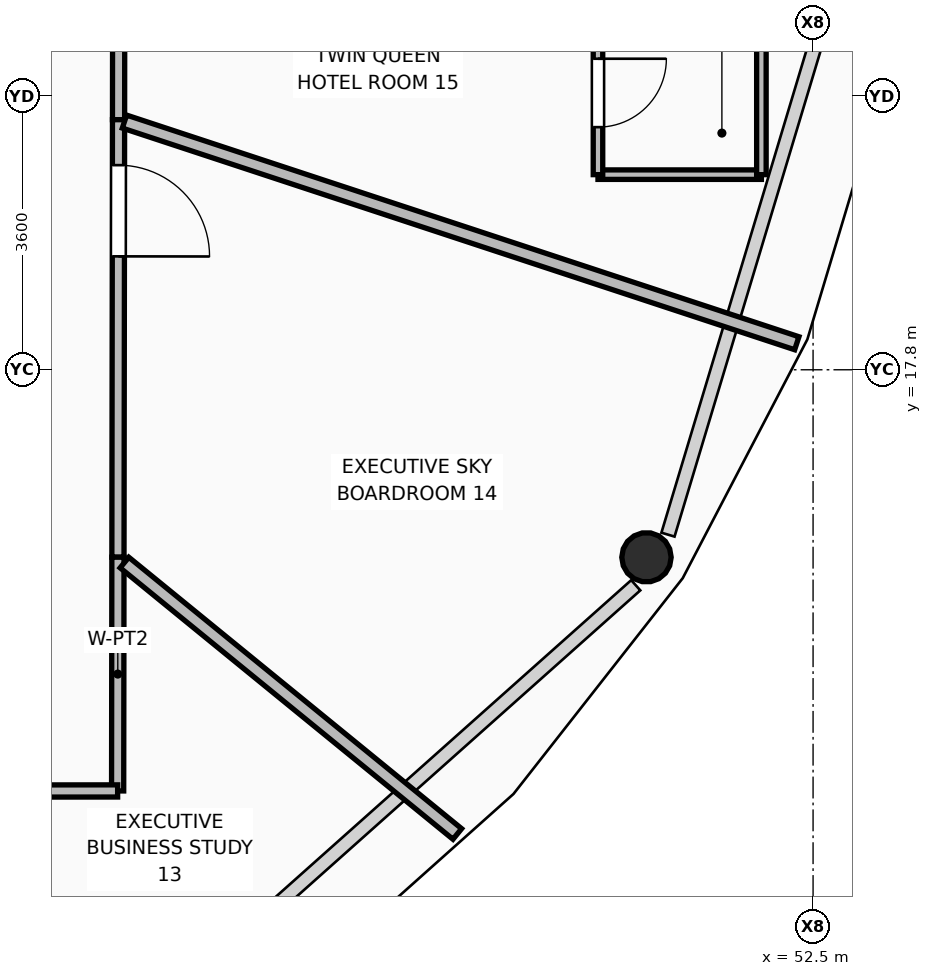
"""IFC4 building model, lengths in metres.
Left out: names, types, materials, properties, quantities, classifications, styles, units other than length and angle.
Written with IfcOpenShell. Run it as: python <this file> out.ifc"""

import sys

from ifc_helpers import new_model, si_unit, direction, frame, frame_2d, origin, origin_2d, place, context, subcontext, project, spatial, rectangle, hollow_circle, extrude, element, fill, save


model = new_model("IFC4")
c1 = context("Model", 3, precision=1e-05, world=origin(), true_north=direction((0.0, 1.0)))
c2 = subcontext(c1, "Body", "Model", "MODEL_VIEW")
j1 = project(units=[si_unit("LENGTHUNIT", "METRE"), si_unit("PLANEANGLEUNIT", "RADIAN")], contexts=[c1])
p1 = place(None, origin())
s1 = spatial("IfcSite", under=j1, at=p1, CompositionType="ELEMENT")
p2 = place(p1, origin())
s2 = spatial("IfcBuilding", under=s1, at=p2, CompositionType="ELEMENT")
p3 = place(p2, frame((0.0, 0.0, 249.9)))
s3 = spatial("IfcBuildingStorey", under=s2, at=p3, CompositionType="ELEMENT", Elevation=249.9)
p4 = place(p3, frame((50.308, 15.333, 0.0), z_axis=(-0.09041731247, 0.046908751519, 0.9947986121), x_axis=(-0.460516000373, -0.887651403086, 0.0)))
e1 = element("IfcColumn", 1, at=p4, inside=s3, PredefinedType="COLUMN", context=c2, shape_type="SweptSolid", body=[
    extrude(hollow_circle(Radius=0.325, WallThickness=0.03, at=origin_2d()), origin(), (0.0, 0.0, 1.0), 3.518),
])
p5 = place(p3, frame((43.365, 23.56, 0.0), z_axis=(0.0, 0.0, 1.0), x_axis=(-0.001186121534, -0.999999296558, 0.0)))
e2 = element("IfcWall", 2, at=p5, inside=s3, PredefinedType="PARTITIONING", context=c2, shape_type="SweptSolid", body=[
    extrude(rectangle(XDim=2.47, YDim=0.16, at=frame_2d((1.235, 0.0))), origin(), (0.0, 0.0, 1.0), 3.012),
])
p6 = place(p3, frame((43.362, 21.09, 0.0), z_axis=(0.0, 0.0, 1.0), x_axis=(-0.001399667798, -0.999999020465, 0.0)))
e3 = element("IfcWall", 3, at=p6, inside=s3, PredefinedType="PARTITIONING", context=c2, shape_type="SweptSolid", body=[
    extrude(rectangle(XDim=5.756, YDim=0.16, at=frame_2d((2.878, 0.0))), origin(), (0.0, 0.0, 1.0), 3.012),
])
p7 = place(p6, frame((0.598, 0.0, 0.0)))
e4 = element("IfcOpeningElement", 4, at=p7, cuts=e3, PredefinedType="OPENING", context=c2, shape_type="SweptSolid", body=[
    extrude(rectangle(XDim=1.2, YDim=2.1, at=frame_2d((0.6, 1.05))), frame((0.0, 0.09, 0.0), z_axis=(0.0, -1.0, 0.0), x_axis=(1.0, 0.0, 0.0)), (0.0, 0.0, 1.0), 0.18),
])
p8 = place(p3, frame((43.354, 15.334, 0.0), z_axis=(0.0, 0.0, 1.0), x_axis=(-0.00127034435, -0.999999193112, 0.0)))
e5 = element("IfcWall", 5, at=p8, inside=s3, PredefinedType="PARTITIONING", context=c2, shape_type="SweptSolid", body=[
    extrude(rectangle(XDim=3.075, YDim=0.16, at=frame_2d((1.538, 0.0))), origin(), (0.0, 0.0, 1.0), 3.48),
])
p9 = place(p3, frame((43.35, 12.259, 0.0), z_axis=(0.0, 0.0, 1.0), x_axis=(-0.999999690731, -0.000786472427, 0.0)))
e6 = element("IfcWall", 6, at=p9, inside=s3, PredefinedType="PARTITIONING", context=c2, shape_type="SweptSolid", body=[
    extrude(rectangle(XDim=3.725, YDim=0.16, at=frame_2d((1.863, 0.0))), origin(), (0.0, 0.0, 1.0), 3.012),
])
p10 = place(p9, frame((2.141, 0.0, 0.0)))
e7 = element("IfcOpeningElement", 7, at=p10, cuts=e6, PredefinedType="OPENING", context=c2, shape_type="SweptSolid", body=[
    extrude(rectangle(XDim=1.0, YDim=2.1, at=frame_2d((0.5, 1.05))), frame((0.0, 0.09, 0.0), z_axis=(0.0, -1.0, 0.0), x_axis=(1.0, 0.0, 0.0)), (0.0, 0.0, 1.0), 0.18),
])
p11 = place(p3, frame((39.676, 12.175, 0.0), z_axis=(0.0, 0.0, 1.0), x_axis=(0.53762070128, -0.843186801103, 0.0)))
e8 = element("IfcWall", 8, at=p11, inside=s3, PredefinedType="PARTITIONING", context=c2, shape_type="SweptSolid", body=[
    extrude(rectangle(XDim=5.171, YDim=0.18, at=frame_2d((2.585, 0.0))), origin(), (0.0, 0.0, 1.0), 2.855),
])
p12 = place(p3, frame((43.44, 15.264, 0.0), z_axis=(0.0, 0.0, 1.0), x_axis=(0.77500924649, -0.631949893469, 0.0)))
e9 = element("IfcWall", 9, at=p12, inside=s3, PredefinedType="PARTITIONING", context=c2, shape_type="SweptSolid", body=[
    extrude(rectangle(XDim=5.65, YDim=0.18, at=frame_2d((2.825, 0.0))), origin(), (0.0, 0.0, 1.0), 2.855),
])
p13 = place(p3, frame((43.44, 21.065, 0.0), z_axis=(0.0, 0.0, 1.0), x_axis=(0.949729147415, -0.313072749613, 0.0)))
e10 = element("IfcWall", 10, at=p13, inside=s3, PredefinedType="PARTITIONING", context=c2, shape_type="SweptSolid", body=[
    extrude(rectangle(XDim=9.314, YDim=0.18, at=frame_2d((4.657, 0.0))), origin(), (0.0, 0.0, 1.0), 2.855),
])
p14 = place(p3, frame((49.67, 20.367, 0.0), z_axis=(0.0, 0.0, 1.0), x_axis=(1.0, 0.0, 0.0)))
e11 = element("IfcWall", 11, at=p14, inside=s3, PredefinedType="PARTITIONING", context=c2, shape_type="SweptSolid", body=[
    extrude(rectangle(XDim=2.15, YDim=0.125, at=frame_2d((1.075, 0.0))), origin(), (0.0, 0.0, 1.0), 2.855),
])
p15 = place(p3, frame((49.67, 20.367, 0.0), z_axis=(0.0, 0.0, 1.0), x_axis=(0.0, 1.0, 0.0)))
e12 = element("IfcWall", 12, at=p15, inside=s3, PredefinedType="PARTITIONING", context=c2, shape_type="SweptSolid", body=[
    extrude(rectangle(XDim=2.15, YDim=0.125, at=frame_2d((1.075, 0.0))), origin(), (0.0, 0.0, 1.0), 3.48),
])
p16 = place(p15, frame((0.625, 0.0, 0.0)))
e13 = element("IfcOpeningElement", 13, at=p16, cuts=e12, PredefinedType="OPENING", context=c2, shape_type="SweptSolid", body=[
    extrude(rectangle(XDim=0.9, YDim=2.1, at=frame_2d((0.45, 1.05))), frame((0.0, 0.073, 0.0), z_axis=(0.0, -1.0, 0.0), x_axis=(1.0, 0.0, 0.0)), (0.0, 0.0, 1.0), 0.145),
])
p17 = place(p3, frame((51.82, 20.367, 0.0), z_axis=(0.0, 0.0, 1.0), x_axis=(0.0, 1.0, 0.0)))
e14 = element("IfcWall", 14, at=p17, inside=s3, PredefinedType="PARTITIONING", context=c2, shape_type="SweptSolid", body=[
    extrude(rectangle(XDim=2.15, YDim=0.125, at=frame_2d((1.075, 0.0))), origin(), (0.0, 0.0, 1.0), 2.855),
])
p18 = place(p7, origin())
e15 = element("IfcDoor", 15, at=p18, inside=s3, OperationType="SINGLE_SWING_RIGHT", PredefinedType="DOOR", context=c2, shape_type="SweptSolid", body=[
    extrude(rectangle(XDim=1.2, YDim=2.1, at=frame_2d((0.6, 1.05))), frame((0.0, 0.025, 0.0), z_axis=(0.0, -1.0, 0.0), x_axis=(1.0, 0.0, 0.0)), (0.0, 0.0, 1.0), 0.05),
])
fill(e4, e15)
p19 = place(p16, frame((0.9, 0.0, 0.0), z_axis=(0.0, 0.0, 1.0), x_axis=(-1.0, 0.0, 0.0)))
e16 = element("IfcDoor", 16, at=p19, inside=s3, OperationType="SINGLE_SWING_LEFT", PredefinedType="DOOR", context=c2, shape_type="SweptSolid", body=[
    extrude(rectangle(XDim=0.9, YDim=2.1, at=frame_2d((0.45, 1.05))), frame((0.0, 0.025, 0.0), z_axis=(0.0, -1.0, 0.0), x_axis=(1.0, 0.0, 0.0)), (0.0, 0.0, 1.0), 0.05),
])
fill(e13, e16)
save(model, sys.argv[1])
